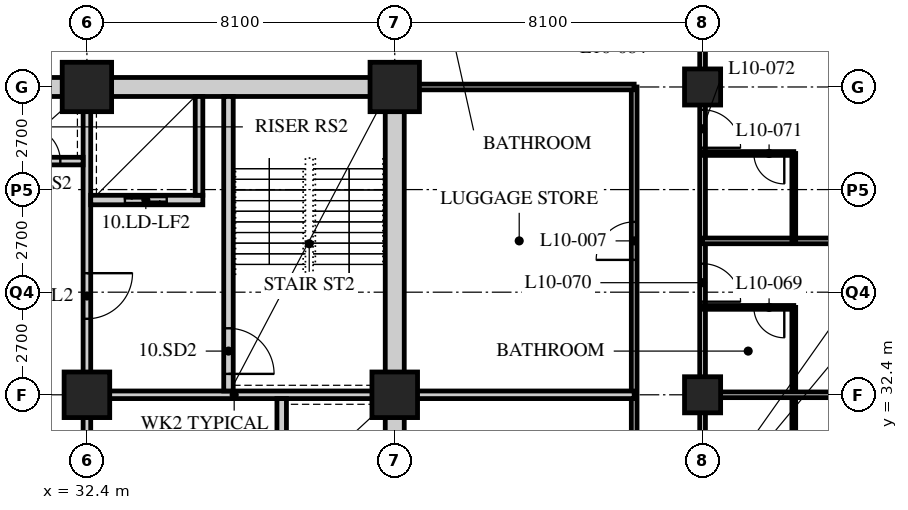
"""IFC4 building model, lengths in metres.
Left out: names, types, materials, properties, quantities, classifications, styles, units other than length and angle.
Written with IfcOpenShell. Run it as: python <this file> out.ifc"""

import sys

from ifc_helpers import new_model, si_unit, direction, frame, frame_2d, origin, origin_2d, place, context, subcontext, project, spatial, rectangle, hollow_rectangle, extrude, element, fill, save


model = new_model("IFC4")
c1 = context("Model", 3, precision=1e-05, world=origin(), true_north=direction((0.0, 1.0)))
c2 = subcontext(c1, "Body", "Model", "MODEL_VIEW")
j1 = project(units=[si_unit("LENGTHUNIT", "METRE"), si_unit("PLANEANGLEUNIT", "RADIAN")], contexts=[c1])
p1 = place(None, origin())
s1 = spatial("IfcSite", under=j1, at=p1, CompositionType="ELEMENT")
p2 = place(p1, origin())
s2 = spatial("IfcBuilding", under=s1, at=p2, CompositionType="ELEMENT")
p3 = place(p2, frame((0.0, 0.0, 46.6)))
s3 = spatial("IfcBuildingStorey", under=s2, at=p3, CompositionType="ELEMENT", Elevation=46.6)
p4 = place(p3, frame((32.4, 32.4, 0.0), z_axis=(0.0, 0.0, 1.0), x_axis=(1.0, 0.0, 0.0)))
e1 = element("IfcColumn", 1, at=p4, inside=s3, PredefinedType="COLUMN", context=c2, shape_type="SweptSolid", body=[
    extrude(hollow_rectangle(XDim=1.2, YDim=1.2, WallThickness=0.12, at=origin_2d()), origin(), (0.0, 0.0, 1.0), 3.4),
])
p5 = place(p3, frame((32.4, 40.5, 0.0), z_axis=(0.0, 0.0, 1.0), x_axis=(1.0, 0.0, 0.0)))
e2 = element("IfcColumn", 2, at=p5, inside=s3, PredefinedType="COLUMN", context=c2, shape_type="SweptSolid", body=[
    extrude(hollow_rectangle(XDim=1.3, YDim=1.3, WallThickness=0.13, at=origin_2d()), origin(), (0.0, 0.0, 1.0), 3.4),
])
p6 = place(p3, frame((40.5, 32.4, 0.0), z_axis=(0.0, 0.0, 1.0), x_axis=(1.0, 0.0, 0.0)))
e3 = element("IfcColumn", 3, at=p6, inside=s3, PredefinedType="COLUMN", context=c2, shape_type="SweptSolid", body=[
    extrude(hollow_rectangle(XDim=1.2, YDim=1.2, WallThickness=0.12, at=origin_2d()), origin(), (0.0, 0.0, 1.0), 3.4),
])
p7 = place(p3, frame((40.5, 40.5, 0.0), z_axis=(0.0, 0.0, 1.0), x_axis=(1.0, 0.0, 0.0)))
e4 = element("IfcColumn", 4, at=p7, inside=s3, PredefinedType="COLUMN", context=c2, shape_type="SweptSolid", body=[
    extrude(hollow_rectangle(XDim=1.3, YDim=1.3, WallThickness=0.13, at=origin_2d()), origin(), (0.0, 0.0, 1.0), 3.4),
])
for number, where, z_axis, x_axis in (
    (5, (48.6, 32.4, 0.0), (0.0, 0.0, 1.0), (1.0, 0.0, 0.0)),
    (6, (48.6, 40.5, 0.0), (0.0, 0.0, 1.0), (1.0, 0.0, 0.0)),
):
    element("IfcColumn", number, at=place(p3, frame(where, z_axis=z_axis, x_axis=x_axis)), inside=s3, PredefinedType="COLUMN", context=c2, shape_type="SweptSolid", body=[
        extrude(hollow_rectangle(XDim=0.95, YDim=0.95, WallThickness=0.095, at=origin_2d()), origin(), (0.0, 0.0, 1.0), 3.4),
    ])
p8 = place(p3, frame((48.6, 16.2, 0.0), z_axis=(0.0, 0.0, 1.0), x_axis=(0.0, 1.0, 0.0)))
e7 = element("IfcWall", 7, at=p8, inside=s3, PredefinedType="PARTITIONING", context=c2, shape_type="SweptSolid", body=[
    extrude(rectangle(XDim=26.1, YDim=0.15, at=frame_2d((13.05, 0.0))), origin(), (0.0, 0.0, 1.0), 2.578),
])
p9 = place(p8, frame((2.75, 0.0, 0.0)))
e8 = element("IfcOpeningElement", 8, at=p9, cuts=e7, PredefinedType="OPENING", context=c2, shape_type="SweptSolid", body=[
    extrude(rectangle(XDim=1.0, YDim=2.1, at=frame_2d((0.5, 1.05))), frame((0.0, 0.085, 0.0), z_axis=(0.0, -1.0, 0.0), x_axis=(1.0, 0.0, 0.0)), (0.0, 0.0, 1.0), 0.17),
])
p10 = place(p8, frame((4.35, 0.0, 0.0)))
e9 = element("IfcOpeningElement", 9, at=p10, cuts=e7, PredefinedType="OPENING", context=c2, shape_type="SweptSolid", body=[
    extrude(rectangle(XDim=1.0, YDim=2.1, at=frame_2d((0.5, 1.05))), frame((0.0, 0.085, 0.0), z_axis=(0.0, -1.0, 0.0), x_axis=(1.0, 0.0, 0.0)), (0.0, 0.0, 1.0), 0.17),
])
p11 = place(p8, frame((10.85, 0.0, 0.0)))
e10 = element("IfcOpeningElement", 10, at=p11, cuts=e7, PredefinedType="OPENING", context=c2, shape_type="SweptSolid", body=[
    extrude(rectangle(XDim=1.0, YDim=2.1, at=frame_2d((0.5, 1.05))), frame((0.0, 0.085, 0.0), z_axis=(0.0, -1.0, 0.0), x_axis=(1.0, 0.0, 0.0)), (0.0, 0.0, 1.0), 0.17),
])
p12 = place(p8, frame((12.45, 0.0, 0.0)))
e11 = element("IfcOpeningElement", 11, at=p12, cuts=e7, PredefinedType="OPENING", context=c2, shape_type="SweptSolid", body=[
    extrude(rectangle(XDim=1.0, YDim=2.1, at=frame_2d((0.5, 1.05))), frame((0.0, 0.085, 0.0), z_axis=(0.0, -1.0, 0.0), x_axis=(1.0, 0.0, 0.0)), (0.0, 0.0, 1.0), 0.17),
])
p13 = place(p8, frame((18.65, 0.0, 0.0)))
e12 = element("IfcOpeningElement", 12, at=p13, cuts=e7, PredefinedType="OPENING", context=c2, shape_type="SweptSolid", body=[
    extrude(rectangle(XDim=1.0, YDim=2.1, at=frame_2d((0.5, 1.05))), frame((0.0, 0.085, 0.0), z_axis=(0.0, -1.0, 0.0), x_axis=(1.0, 0.0, 0.0)), (0.0, 0.0, 1.0), 0.17),
])
p14 = place(p8, frame((22.7, 0.0, 0.0)))
e13 = element("IfcOpeningElement", 13, at=p14, cuts=e7, PredefinedType="OPENING", context=c2, shape_type="SweptSolid", body=[
    extrude(rectangle(XDim=1.0, YDim=2.1, at=frame_2d((0.5, 1.05))), frame((0.0, 0.085, 0.0), z_axis=(0.0, -1.0, 0.0), x_axis=(1.0, 0.0, 0.0)), (0.0, 0.0, 1.0), 0.17),
])
p15 = place(p3, frame((46.8, 18.0, 0.0), z_axis=(0.0, 0.0, 1.0), x_axis=(0.0, 1.0, 0.0)))
e14 = element("IfcWall", 14, at=p15, inside=s3, PredefinedType="PARTITIONING", context=c2, shape_type="SweptSolid", body=[
    extrude(rectangle(XDim=22.5, YDim=0.15, at=frame_2d((11.25, 0.0))), origin(), (0.0, 0.0, 1.0), 3.19),
])
p16 = place(p15, frame((7.229, 0.0, 0.0)))
e15 = element("IfcOpeningElement", 15, at=p16, cuts=e14, PredefinedType="OPENING", context=c2, shape_type="SweptSolid", body=[
    extrude(rectangle(XDim=1.0, YDim=2.1, at=frame_2d((0.5, 1.05))), frame((0.0, 0.085, 0.0), z_axis=(0.0, -1.0, 0.0), x_axis=(1.0, 0.0, 0.0)), (0.0, 0.0, 1.0), 0.17),
])
p17 = place(p15, frame((11.279, 0.0, 0.0)))
e16 = element("IfcOpeningElement", 16, at=p17, cuts=e14, PredefinedType="OPENING", context=c2, shape_type="SweptSolid", body=[
    extrude(rectangle(XDim=1.0, YDim=2.1, at=frame_2d((0.5, 1.05))), frame((0.0, 0.085, 0.0), z_axis=(0.0, -1.0, 0.0), x_axis=(1.0, 0.0, 0.0)), (0.0, 0.0, 1.0), 0.17),
])
p18 = place(p15, frame((17.95, 0.0, 0.0)))
e17 = element("IfcOpeningElement", 17, at=p18, cuts=e14, PredefinedType="OPENING", context=c2, shape_type="SweptSolid", body=[
    extrude(rectangle(XDim=1.0, YDim=2.1, at=frame_2d((0.5, 1.05))), frame((0.0, 0.085, 0.0), z_axis=(0.0, -1.0, 0.0), x_axis=(1.0, 0.0, 0.0)), (0.0, 0.0, 1.0), 0.17),
])
p19 = place(p3, frame((46.8, 40.5, 0.0), z_axis=(0.0, 0.0, 1.0), x_axis=(-1.0, 0.0, 0.0)))
e18 = element("IfcWall", 18, at=p19, inside=s3, PredefinedType="PARTITIONING", context=c2, shape_type="SweptSolid", body=[
    extrude(rectangle(XDim=6.1, YDim=0.15, at=frame_2d((3.05, 0.0))), origin(), (0.0, 0.0, 1.0), 2.578),
])
p20 = place(p3, frame((40.5, 32.4, 0.0), z_axis=(0.0, 0.0, 1.0), x_axis=(1.0, 0.0, 0.0)))
e19 = element("IfcWall", 19, at=p20, inside=s3, PredefinedType="SOLIDWALL", context=c2, shape_type="SweptSolid", body=[
    extrude(rectangle(XDim=6.3, YDim=0.2, at=frame_2d((3.15, 0.0))), origin(), (0.0, 0.0, 1.0), 2.578),
])
p21 = place(p3, frame((51.0, 29.8, 0.0), z_axis=(0.0, 0.0, 1.0), x_axis=(0.0, 1.0, 0.0)))
e20 = element("IfcWall", 20, at=p21, inside=s3, PredefinedType="PARTITIONING", context=c2, shape_type="SweptSolid", body=[
    extrude(rectangle(XDim=4.9, YDim=0.1, at=frame_2d((2.45, 0.0))), origin(), (0.0, 0.0, 1.0), 3.19),
])
p22 = place(p3, frame((48.6, 32.4, 0.0), z_axis=(0.0, 0.0, 1.0), x_axis=(1.0, 0.0, 0.0)))
e21 = element("IfcWall", 21, at=p22, inside=s3, PredefinedType="PARTITIONING", context=c2, shape_type="SweptSolid", body=[
    extrude(rectangle(XDim=7.8, YDim=0.15, at=frame_2d((3.9, 0.0))), origin(), (0.0, 0.0, 1.0), 2.578),
])
p23 = place(p3, frame((48.6, 34.7, 0.0), z_axis=(0.0, 0.0, 1.0), x_axis=(1.0, 0.0, 0.0)))
e22 = element("IfcWall", 22, at=p23, inside=s3, PredefinedType="PARTITIONING", context=c2, shape_type="SweptSolid", body=[
    extrude(rectangle(XDim=2.4, YDim=0.1, at=frame_2d((1.2, 0.0))), origin(), (0.0, 0.0, 1.0), 3.19),
])
p24 = place(p23, frame((1.35, 0.0, 0.0)))
e23 = element("IfcOpeningElement", 23, at=p24, cuts=e22, PredefinedType="OPENING", context=c2, shape_type="SweptSolid", body=[
    extrude(rectangle(XDim=0.8, YDim=2.1, at=frame_2d((0.4, 1.05))), frame((0.0, 0.06, 0.0), z_axis=(0.0, -1.0, 0.0), x_axis=(1.0, 0.0, 0.0)), (0.0, 0.0, 1.0), 0.12),
])
p25 = place(p3, frame((48.6, 36.45, 0.0), z_axis=(0.0, 0.0, 1.0), x_axis=(1.0, 0.0, 0.0)))
e24 = element("IfcWall", 24, at=p25, inside=s3, PredefinedType="PARTITIONING", context=c2, shape_type="SweptSolid", body=[
    extrude(rectangle(XDim=7.8, YDim=0.15, at=frame_2d((3.9, 0.0))), origin(), (0.0, 0.0, 1.0), 3.19),
])
p26 = place(p3, frame((51.0, 36.45, 0.0), z_axis=(0.0, 0.0, 1.0), x_axis=(0.0, 1.0, 0.0)))
e25 = element("IfcWall", 25, at=p26, inside=s3, PredefinedType="PARTITIONING", context=c2, shape_type="SweptSolid", body=[
    extrude(rectangle(XDim=2.3, YDim=0.1, at=frame_2d((1.15, 0.0))), origin(), (0.0, 0.0, 1.0), 3.19),
])
p27 = place(p3, frame((48.6, 38.75, 0.0), z_axis=(0.0, 0.0, 1.0), x_axis=(1.0, 0.0, 0.0)))
e26 = element("IfcWall", 26, at=p27, inside=s3, PredefinedType="PARTITIONING", context=c2, shape_type="SweptSolid", body=[
    extrude(rectangle(XDim=2.4, YDim=0.1, at=frame_2d((1.2, 0.0))), origin(), (0.0, 0.0, 1.0), 3.19),
])
p28 = place(p27, frame((1.35, 0.0, 0.0)))
e27 = element("IfcOpeningElement", 27, at=p28, cuts=e26, PredefinedType="OPENING", context=c2, shape_type="SweptSolid", body=[
    extrude(rectangle(XDim=0.8, YDim=2.1, at=frame_2d((0.4, 1.05))), frame((0.0, 0.06, 0.0), z_axis=(0.0, -1.0, 0.0), x_axis=(1.0, 0.0, 0.0)), (0.0, 0.0, 1.0), 0.12),
])
p29 = place(p3, frame((15.95, 40.5, 0.0), z_axis=(0.0, 0.0, 1.0), x_axis=(1.0, 0.0, 0.0)))
e28 = element("IfcWall", 28, at=p29, inside=s3, PredefinedType="SOLIDWALL", context=c2, shape_type="SweptSolid", body=[
    extrude(rectangle(XDim=24.8, YDim=0.5, at=frame_2d((12.4, 0.0))), origin(), (0.0, 0.0, 1.0), 2.54),
])
p30 = place(p29, frame((11.5, 0.0, 0.0)))
e29 = element("IfcOpeningElement", 29, at=p30, cuts=e28, PredefinedType="OPENING", context=c2, shape_type="SweptSolid", body=[
    extrude(rectangle(XDim=1.8, YDim=2.4, at=frame_2d((0.9, 1.2))), frame((0.0, 0.26, 0.0), z_axis=(0.0, -1.0, 0.0), x_axis=(1.0, 0.0, 0.0)), (0.0, 0.0, 1.0), 0.52),
])
p31 = place(p3, frame((40.5, 24.55, 0.0), z_axis=(0.0, 0.0, 1.0), x_axis=(0.0, 1.0, 0.0)))
e30 = element("IfcWall", 30, at=p31, inside=s3, PredefinedType="SOLIDWALL", context=c2, shape_type="SweptSolid", body=[
    extrude(rectangle(XDim=15.7, YDim=0.5, at=frame_2d((7.85, 0.0))), origin(), (0.0, 0.0, 1.0), 2.578),
])
p32 = place(p3, frame((32.3, 32.4, 0.0), z_axis=(0.0, 0.0, 1.0), x_axis=(1.0, 0.0, 0.0)))
e31 = element("IfcWall", 31, at=p32, inside=s3, PredefinedType="SOLIDWALL", context=c2, shape_type="SweptSolid", body=[
    extrude(rectangle(XDim=7.95, YDim=0.2, at=frame_2d((3.975, 0.0))), origin(), (0.0, 0.0, 1.0), 2.578),
])
p33 = place(p3, frame((32.4, 32.5, 0.0), z_axis=(0.0, 0.0, 1.0), x_axis=(0.0, 1.0, 0.0)))
e32 = element("IfcWall", 32, at=p33, inside=s3, PredefinedType="SOLIDWALL", context=c2, shape_type="SweptSolid", body=[
    extrude(rectangle(XDim=7.75, YDim=0.2, at=frame_2d((3.875, 0.0))), origin(), (0.0, 0.0, 1.0), 2.578),
])
p34 = place(p33, frame((1.9, 0.0, 0.0)))
e33 = element("IfcOpeningElement", 33, at=p34, cuts=e32, PredefinedType="OPENING", context=c2, shape_type="SweptSolid", body=[
    extrude(rectangle(XDim=1.2, YDim=2.1, at=frame_2d((0.6, 1.05))), frame((0.0, 0.11, 0.0), z_axis=(0.0, -1.0, 0.0), x_axis=(1.0, 0.0, 0.0)), (0.0, 0.0, 1.0), 0.22),
])
p35 = place(p3, frame((37.525, 24.55, 0.0), z_axis=(0.0, 0.0, 1.0), x_axis=(0.0, 1.0, 0.0)))
e34 = element("IfcWall", 34, at=p35, inside=s3, PredefinedType="SOLIDWALL", context=c2, shape_type="SweptSolid", body=[
    extrude(rectangle(XDim=7.75, YDim=0.25, at=frame_2d((3.875, 0.0))), origin(), (0.0, 0.0, 1.0), 3.19),
])
p36 = place(p3, frame((36.125, 32.5, 0.0), z_axis=(0.0, 0.0, 1.0), x_axis=(0.0, 1.0, 0.0)))
e35 = element("IfcWall", 35, at=p36, inside=s3, PredefinedType="SOLIDWALL", context=c2, shape_type="SweptSolid", body=[
    extrude(rectangle(XDim=7.75, YDim=0.25, at=frame_2d((3.875, 0.0))), origin(), (0.0, 0.0, 1.0), 3.19),
])
p37 = place(p36, frame((0.45, 0.0, 0.0)))
e36 = element("IfcOpeningElement", 36, at=p37, cuts=e35, PredefinedType="OPENING", context=c2, shape_type="SweptSolid", body=[
    extrude(rectangle(XDim=1.2, YDim=2.1, at=frame_2d((0.6, 1.05))), frame((0.0, 0.135, 0.0), z_axis=(0.0, -1.0, 0.0), x_axis=(1.0, 0.0, 0.0)), (0.0, 0.0, 1.0), 0.27),
])
p38 = place(p3, frame((32.5, 37.525, 0.0), z_axis=(0.0, 0.0, 1.0), x_axis=(1.0, 0.0, 0.0)))
e37 = element("IfcWall", 37, at=p38, inside=s3, PredefinedType="SOLIDWALL", context=c2, shape_type="SweptSolid", body=[
    extrude(rectangle(XDim=2.95, YDim=0.25, at=frame_2d((1.475, 0.0))), origin(), (0.0, 0.0, 1.0), 3.19),
])
p39 = place(p38, frame((0.9, 0.0, 0.0)))
e38 = element("IfcOpeningElement", 38, at=p39, cuts=e37, PredefinedType="OPENING", context=c2, shape_type="SweptSolid", body=[
    extrude(rectangle(XDim=1.1, YDim=2.4, at=frame_2d((0.55, 1.2))), frame((0.0, 0.135, 0.0), z_axis=(0.0, -1.0, 0.0), x_axis=(1.0, 0.0, 0.0)), (0.0, 0.0, 1.0), 0.27),
])
p40 = place(p3, frame((35.35, 37.65, 0.0), z_axis=(0.0, 0.0, 1.0), x_axis=(0.0, 1.0, 0.0)))
e39 = element("IfcWall", 39, at=p40, inside=s3, PredefinedType="SOLIDWALL", context=c2, shape_type="SweptSolid", body=[
    extrude(rectangle(XDim=2.6, YDim=0.2, at=frame_2d((1.3, 0.0))), origin(), (0.0, 0.0, 1.0), 3.19),
])
p41 = place(p3, frame((30.15, 38.55, 0.0), z_axis=(0.0, 0.0, 1.0), x_axis=(1.0, 0.0, 0.0)))
e40 = element("IfcWall", 40, at=p41, inside=s3, PredefinedType="SOLIDWALL", context=c2, shape_type="SweptSolid", body=[
    extrude(rectangle(XDim=2.15, YDim=0.2, at=frame_2d((1.075, 0.0))), origin(), (0.0, 0.0, 1.0), 3.19),
])
p42 = place(p41, frame((0.65, 0.0, 0.0)))
e41 = element("IfcOpeningElement", 41, at=p42, cuts=e40, PredefinedType="OPENING", context=c2, shape_type="SweptSolid", body=[
    extrude(rectangle(XDim=0.9, YDim=2.1, at=frame_2d((0.45, 1.05))), frame((0.0, 0.11, 0.0), z_axis=(0.0, -1.0, 0.0), x_axis=(1.0, 0.0, 0.0)), (0.0, 0.0, 1.0), 0.22),
])
p43 = place(p3, frame((32.4, 24.55, 0.0), z_axis=(0.0, 0.0, 1.0), x_axis=(0.0, 1.0, 0.0)))
e42 = element("IfcWall", 42, at=p43, inside=s3, PredefinedType="PARTITIONING", context=c2, shape_type="SweptSolid", body=[
    extrude(rectangle(XDim=7.75, YDim=0.2, at=frame_2d((3.875, 0.0))), origin(), (0.0, 0.0, 1.0), 2.578),
])
p44 = place(p43, frame((1.4, 0.0, 0.0)))
e43 = element("IfcOpeningElement", 43, at=p44, cuts=e42, PredefinedType="OPENING", context=c2, shape_type="SweptSolid", body=[
    extrude(rectangle(XDim=0.9, YDim=2.1, at=frame_2d((0.45, 1.05))), frame((0.0, 0.11, 0.0), z_axis=(0.0, -1.0, 0.0), x_axis=(1.0, 0.0, 0.0)), (0.0, 0.0, 1.0), 0.22),
])
p45 = place(p43, frame((5.35, 0.0, 0.0)))
e44 = element("IfcOpeningElement", 44, at=p45, cuts=e42, PredefinedType="OPENING", context=c2, shape_type="SweptSolid", body=[
    extrude(rectangle(XDim=0.9, YDim=2.1, at=frame_2d((0.45, 1.05))), frame((0.0, 0.11, 0.0), z_axis=(0.0, -1.0, 0.0), x_axis=(1.0, 0.0, 0.0)), (0.0, 0.0, 1.0), 0.22),
])
p46 = place(p18, origin())
e45 = element("IfcDoor", 45, at=p46, inside=s3, OperationType="SINGLE_SWING_LEFT", PredefinedType="DOOR", context=c2, shape_type="SweptSolid", body=[
    extrude(rectangle(XDim=1.0, YDim=2.1, at=frame_2d((0.5, 1.05))), frame((0.0, 0.025, 0.0), z_axis=(0.0, -1.0, 0.0), x_axis=(1.0, 0.0, 0.0)), (0.0, 0.0, 1.0), 0.05),
])
fill(e17, e45)
p47 = place(p24, origin())
e46 = element("IfcDoor", 46, at=p47, inside=s3, OperationType="SINGLE_SWING_LEFT", PredefinedType="DOOR", context=c2, shape_type="SweptSolid", body=[
    extrude(rectangle(XDim=0.8, YDim=2.1, at=frame_2d((0.4, 1.05))), frame((0.0, 0.025, 0.0), z_axis=(0.0, -1.0, 0.0), x_axis=(1.0, 0.0, 0.0)), (0.0, 0.0, 1.0), 0.05),
])
fill(e23, e46)
p48 = place(p13, origin())
e47 = element("IfcDoor", 47, at=p48, inside=s3, OperationType="SINGLE_SWING_RIGHT", PredefinedType="DOOR", context=c2, shape_type="SweptSolid", body=[
    extrude(rectangle(XDim=1.0, YDim=2.1, at=frame_2d((0.5, 1.05))), frame((0.0, 0.025, 0.0), z_axis=(0.0, -1.0, 0.0), x_axis=(1.0, 0.0, 0.0)), (0.0, 0.0, 1.0), 0.05),
])
fill(e12, e47)
p49 = place(p28, origin())
e48 = element("IfcDoor", 48, at=p49, inside=s3, OperationType="SINGLE_SWING_LEFT", PredefinedType="DOOR", context=c2, shape_type="SweptSolid", body=[
    extrude(rectangle(XDim=0.8, YDim=2.1, at=frame_2d((0.4, 1.05))), frame((0.0, 0.025, 0.0), z_axis=(0.0, -1.0, 0.0), x_axis=(1.0, 0.0, 0.0)), (0.0, 0.0, 1.0), 0.05),
])
fill(e27, e48)
p50 = place(p14, origin())
e49 = element("IfcDoor", 49, at=p50, inside=s3, OperationType="SINGLE_SWING_RIGHT", PredefinedType="DOOR", context=c2, shape_type="SweptSolid", body=[
    extrude(rectangle(XDim=1.0, YDim=2.1, at=frame_2d((0.5, 1.05))), frame((0.0, 0.025, 0.0), z_axis=(0.0, -1.0, 0.0), x_axis=(1.0, 0.0, 0.0)), (0.0, 0.0, 1.0), 0.05),
])
fill(e13, e49)
p51 = place(p37, origin())
e50 = element("IfcDoor", 50, at=p51, inside=s3, OperationType="SINGLE_SWING_RIGHT", PredefinedType="DOOR", context=c2, shape_type="SweptSolid", body=[
    extrude(rectangle(XDim=1.2, YDim=2.1, at=frame_2d((0.6, 1.05))), frame((0.0, 0.025, 0.0), z_axis=(0.0, -1.0, 0.0), x_axis=(1.0, 0.0, 0.0)), (0.0, 0.0, 1.0), 0.05),
])
fill(e36, e50)
p52 = place(p34, origin())
e51 = element("IfcDoor", 51, at=p52, inside=s3, OperationType="SINGLE_SWING_LEFT", PredefinedType="DOOR", context=c2, shape_type="SweptSolid", body=[
    extrude(rectangle(XDim=1.2, YDim=2.1, at=frame_2d((0.6, 1.05))), frame((0.0, 0.025, 0.0), z_axis=(0.0, -1.0, 0.0), x_axis=(1.0, 0.0, 0.0)), (0.0, 0.0, 1.0), 0.05),
])
fill(e33, e51)
p53 = place(p42, origin())
e52 = element("IfcDoor", 52, at=p53, inside=s3, OperationType="SINGLE_SWING_LEFT", PredefinedType="DOOR", context=c2, shape_type="SweptSolid", body=[
    extrude(rectangle(XDim=0.9, YDim=2.1, at=frame_2d((0.45, 1.05))), frame((0.0, 0.025, 0.0), z_axis=(0.0, -1.0, 0.0), x_axis=(1.0, 0.0, 0.0)), (0.0, 0.0, 1.0), 0.05),
])
fill(e41, e52)
p54 = place(p39, origin())
e53 = element("IfcDoor", 53, at=p54, inside=s3, OperationType="DOUBLE_DOOR_SLIDING", PredefinedType="DOOR", context=c2, shape_type="SweptSolid", body=[
    extrude(rectangle(XDim=1.1, YDim=2.4, at=frame_2d((0.55, 1.2))), frame((0.0, 0.025, 0.0), z_axis=(0.0, -1.0, 0.0), x_axis=(1.0, 0.0, 0.0)), (0.0, 0.0, 1.0), 0.05),
])
fill(e38, e53)
save(model, sys.argv[1])
